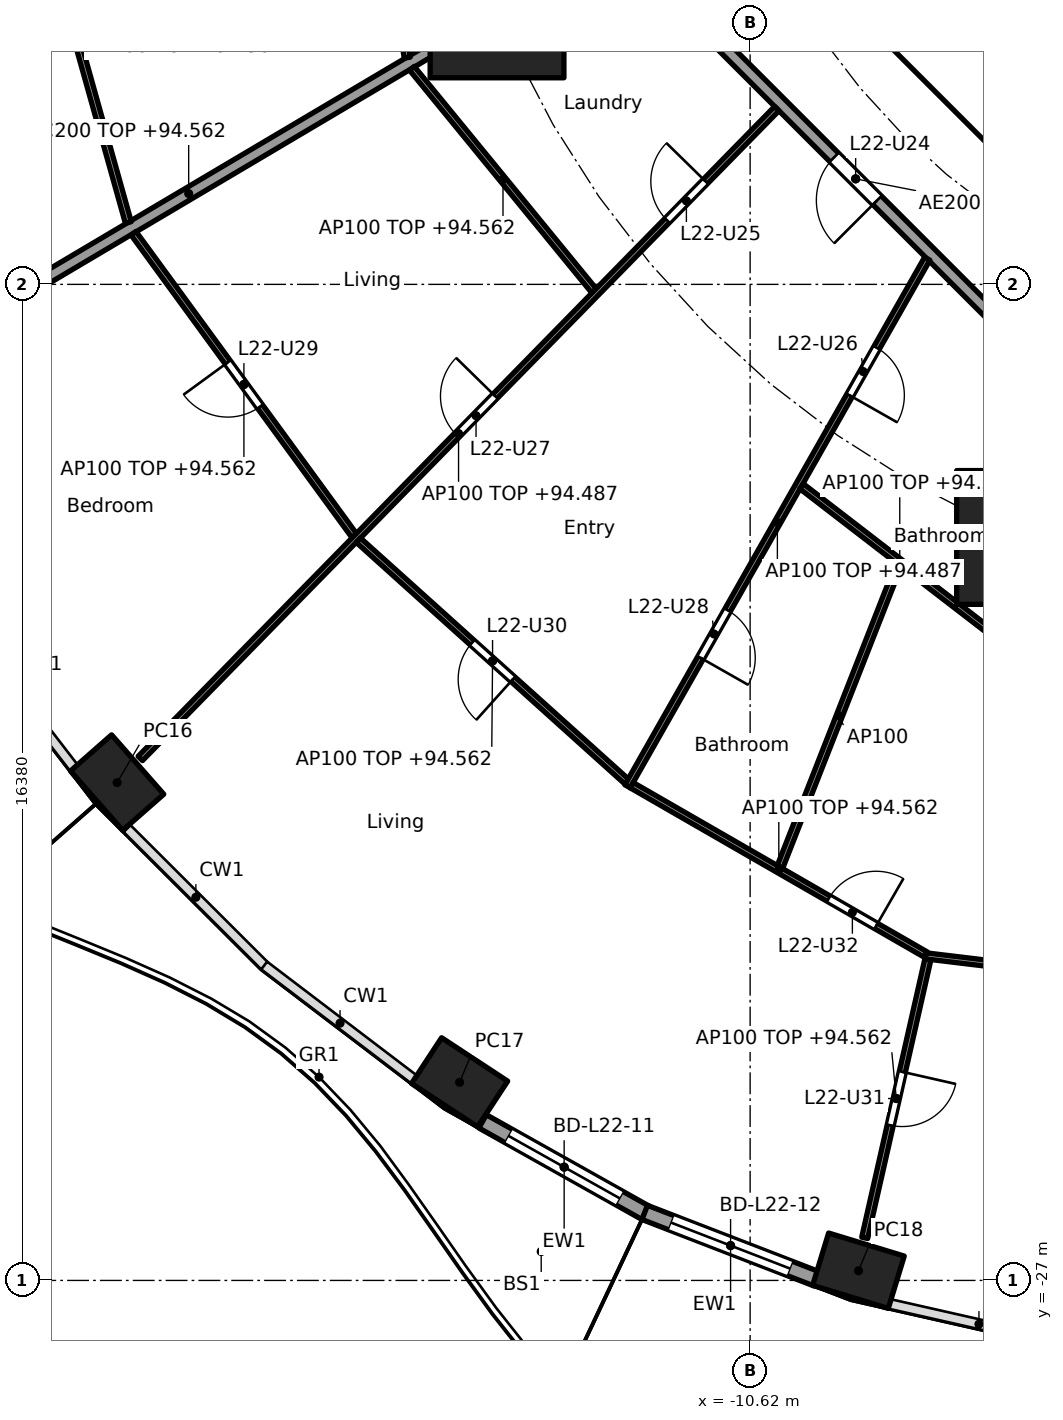
"""IFC4 building model, lengths in metres.
Left out: names, types, materials, properties, quantities, classifications, styles, units other than length and angle.
Written with IfcOpenShell. Run it as: python <this file> out.ifc"""

import sys

from ifc_helpers import new_model, si_unit, direction, frame, frame_2d, origin, origin_2d, place, context, subcontext, project, spatial, rectangle, hollow_rectangle, extrude, element, fill, save


model = new_model("IFC4")
c1 = context("Model", 3, precision=1e-05, world=origin(), true_north=direction((0.0, 1.0)))
c2 = subcontext(c1, "Body", "Model", "MODEL_VIEW")
j1 = project(units=[si_unit("LENGTHUNIT", "METRE"), si_unit("PLANEANGLEUNIT", "RADIAN")], contexts=[c1])
p1 = place(None, origin())
s1 = spatial("IfcSite", under=j1, at=p1, CompositionType="ELEMENT")
p2 = place(p1, origin())
s2 = spatial("IfcBuilding", under=s1, at=p2, CompositionType="ELEMENT")
p3 = place(p2, frame((0.0, 0.0, 91.8)))
s3 = spatial("IfcBuildingStorey", under=s2, at=p3, CompositionType="ELEMENT", Elevation=91.8)
for number, where, z_axis, x_axis in (
    (1, (-21.03, -18.813, 0.0), (0.0, 0.0, 1.0), (0.66, -0.751, 0.0)),
    (2, (-15.397, -23.742, 0.0), (0.0, 0.0, 1.0), (0.836, -0.549, 0.0)),
    (3, (-8.839, -26.841, 0.0), (0.0, 0.0, 1.0), (0.957, -0.292, 0.0)),
):
    element("IfcColumn", number, at=place(p3, frame(where, z_axis=z_axis, x_axis=x_axis)), inside=s3, PredefinedType="COLUMN", context=c2, shape_type="SweptSolid", body=[
        extrude(hollow_rectangle(XDim=1.3, YDim=0.9, WallThickness=0.045, at=origin_2d()), origin(), (0.0, 0.0, 1.0), 3.7),
    ])
for number, where, z_axis, x_axis in (
    (4, (-14.782, -6.123, 0.0), (0.0, 0.0, 1.0), (1.0, 0.0, 0.0)),
    (5, (-6.123, -14.782, 0.0), (0.0, 0.0, 1.0), (1.0, 0.0, 0.0)),
):
    element("IfcColumn", number, at=place(p3, frame(where, z_axis=z_axis, x_axis=x_axis)), inside=s3, PredefinedType="COLUMN", context=c2, shape_type="SweptSolid", body=[
        extrude(rectangle(XDim=2.2, YDim=2.2, at=origin_2d()), origin(), (0.0, 0.0, 1.0), 3.7),
    ])
p4 = place(p3, frame((-12.337, -25.889, 0.0), z_axis=(0.0, 0.0, 1.0), x_axis=(-0.872090167423, 0.489345215451, 0.0)))
e6 = element("IfcWall", 6, at=p4, inside=s3, PredefinedType="SOLIDWALL", context=c2, shape_type="SweptSolid", body=[
    extrude(rectangle(XDim=3.076, YDim=0.25, at=frame_2d((1.538, 0.0))), origin(), (0.0, 0.0, 1.0), 3.44),
])
p5 = place(p4, frame((0.488, 0.0, 0.0)))
e7 = element("IfcOpeningElement", 7, at=p5, cuts=e6, PredefinedType="OPENING", context=c2, shape_type="SweptSolid", body=[
    extrude(rectangle(XDim=2.1, YDim=2.4, at=frame_2d((1.05, 1.2))), frame((0.0, 0.135, 0.0), z_axis=(0.0, -1.0, 0.0), x_axis=(1.0, 0.0, 0.0)), (0.0, 0.0, 1.0), 0.27),
])
p6 = place(p3, frame((-9.529, -26.973, 0.0), z_axis=(0.0, 0.0, 1.0), x_axis=(-0.932827091302, 0.360324322982, 0.0)))
e8 = element("IfcWall", 8, at=p6, inside=s3, PredefinedType="SOLIDWALL", context=c2, shape_type="SweptSolid", body=[
    extrude(rectangle(XDim=3.027, YDim=0.25, at=frame_2d((1.514, 0.0))), origin(), (0.0, 0.0, 1.0), 3.44),
])
p7 = place(p6, frame((0.464, 0.0, 0.0)))
e9 = element("IfcOpeningElement", 9, at=p7, cuts=e8, PredefinedType="OPENING", context=c2, shape_type="SweptSolid", body=[
    extrude(rectangle(XDim=2.1, YDim=2.4, at=frame_2d((1.05, 1.2))), frame((0.0, 0.135, 0.0), z_axis=(0.0, -1.0, 0.0), x_axis=(1.0, 0.0, 0.0)), (0.0, 0.0, 1.0), 0.27),
])
p8 = place(p3, frame((-9.988, -4.613, 0.0), z_axis=(0.0, 0.0, 1.0), x_axis=(0.707106781187, -0.707106781187, 0.0)))
e10 = element("IfcWall", 10, at=p8, inside=s3, PredefinedType="SHEAR", context=c2, shape_type="SweptSolid", body=[
    extrude(rectangle(XDim=7.602, YDim=0.6, at=frame_2d((3.801, 0.0))), origin(), (0.0, 0.0, 1.0), 3.44),
])
p9 = place(p8, frame((6.151, 0.0, 0.0)))
e11 = element("IfcOpeningElement", 11, at=p9, cuts=e10, PredefinedType="OPENING", context=c2, shape_type="SweptSolid", body=[
    extrude(rectangle(XDim=1.1, YDim=2.1, at=frame_2d((0.55, 1.05))), frame((0.0, 0.31, 0.0), z_axis=(0.0, -1.0, 0.0), x_axis=(1.0, 0.0, 0.0)), (0.0, 0.0, 1.0), 0.62),
])
p10 = place(p3, frame((-14.825, -6.148, 0.0), z_axis=(0.0, 0.0, 1.0), x_axis=(-0.860400431487, -0.509618580408, 0.0)))
e12 = element("IfcWall", 12, at=p10, inside=s3, PredefinedType="PARTITIONING", context=c2, shape_type="SweptSolid", body=[
    extrude(rectangle(XDim=11.688, YDim=0.2, at=frame_2d((5.844, 0.0))), origin(), (0.0, 0.0, 1.0), 2.762),
])
p11 = place(p3, frame((-12.635, -5.134, 0.0), z_axis=(0.0, 0.0, 1.0), x_axis=(0.707106781187, -0.707106781187, 0.0)))
e13 = element("IfcWall", 13, at=p11, inside=s3, PredefinedType="PARTITIONING", context=c2, shape_type="SweptSolid", body=[
    extrude(rectangle(XDim=10.609, YDim=0.2, at=frame_2d((5.305, 0.0))), origin(), (0.0, 0.0, 1.0), 3.44),
])
p12 = place(p11, frame((4.804, 0.0, 0.0)))
e14 = element("IfcOpeningElement", 14, at=p12, cuts=e13, PredefinedType="OPENING", context=c2, shape_type="SweptSolid", body=[
    extrude(rectangle(XDim=1.0, YDim=2.1, at=frame_2d((0.5, 1.05))), frame((0.0, 0.11, 0.0), z_axis=(0.0, -1.0, 0.0), x_axis=(1.0, 0.0, 0.0)), (0.0, 0.0, 1.0), 0.22),
])
p13 = place(p3, frame((-16.888, -2.577, 0.0), z_axis=(0.0, 0.0, 1.0), x_axis=(0.144228053649, -0.989544475272, 0.0)))
e15 = element("IfcWall", 15, at=p13, inside=s3, PredefinedType="PARTITIONING", context=c2, shape_type="SweptSolid", body=[
    extrude(rectangle(XDim=4.359, YDim=0.1, at=frame_2d((2.179, 0.0))), origin(), (0.0, 0.0, 1.0), 2.762),
])
p14 = place(p3, frame((-22.463, -3.832, 0.0), z_axis=(0.0, 0.0, 1.0), x_axis=(0.269805201578, -0.962914925215, 0.0)))
e16 = element("IfcWall", 16, at=p14, inside=s3, PredefinedType="PARTITIONING", context=c2, shape_type="SweptSolid", body=[
    extrude(rectangle(XDim=5.993, YDim=0.1, at=frame_2d((2.997, 0.0))), origin(), (0.0, 0.0, 1.0), 2.762),
])
p15 = place(p3, frame((-16.182, -7.067, 0.0), z_axis=(0.0, 0.0, 1.0), x_axis=(0.633400832951, -0.773823871962, 0.0)))
e17 = element("IfcWall", 17, at=p15, inside=s3, PredefinedType="PARTITIONING", context=c2, shape_type="SweptSolid", body=[
    extrude(rectangle(XDim=4.729, YDim=0.1, at=frame_2d((2.365, 0.0))), origin(), (0.0, 0.0, 1.0), 2.762),
])
p16 = place(p3, frame((-20.76, -9.779, 0.0), z_axis=(0.0, 0.0, 1.0), x_axis=(0.589597019189, -0.807697564045, 0.0)))
e18 = element("IfcWall", 18, at=p16, inside=s3, PredefinedType="PARTITIONING", context=c2, shape_type="SweptSolid", body=[
    extrude(rectangle(XDim=6.158, YDim=0.1, at=frame_2d((3.079, 0.0))), origin(), (0.0, 0.0, 1.0), 2.762),
])
p17 = place(p16, frame((2.629, 0.0, 0.0)))
e19 = element("IfcOpeningElement", 19, at=p17, cuts=e18, PredefinedType="OPENING", context=c2, shape_type="SweptSolid", body=[
    extrude(rectangle(XDim=0.9, YDim=2.1, at=frame_2d((0.45, 1.05))), frame((0.0, 0.06, 0.0), z_axis=(0.0, -1.0, 0.0), x_axis=(1.0, 0.0, 0.0)), (0.0, 0.0, 1.0), 0.12),
])
p18 = place(p3, frame((-10.181, -7.729, 0.0), z_axis=(0.0, 0.0, 1.0), x_axis=(-0.699708106083, -0.714428839201, 0.0)))
e20 = element("IfcWall", 20, at=p18, inside=s3, PredefinedType="PARTITIONING", context=c2, shape_type="SweptSolid", body=[
    extrude(rectangle(XDim=14.959, YDim=0.1, at=frame_2d((7.48, 0.0))), origin(), (0.0, 0.0, 1.0), 2.687),
])
p19 = place(p18, frame((1.675, 0.0, 0.0)))
e21 = element("IfcOpeningElement", 21, at=p19, cuts=e20, PredefinedType="OPENING", context=c2, shape_type="SweptSolid", body=[
    extrude(rectangle(XDim=0.9, YDim=2.1, at=frame_2d((0.45, 1.05))), frame((0.0, 0.06, 0.0), z_axis=(0.0, -1.0, 0.0), x_axis=(1.0, 0.0, 0.0)), (0.0, 0.0, 1.0), 0.12),
])
p20 = place(p18, frame((6.619, 0.0, 0.0)))
e22 = element("IfcOpeningElement", 22, at=p20, cuts=e20, PredefinedType="OPENING", context=c2, shape_type="SweptSolid", body=[
    extrude(rectangle(XDim=0.9, YDim=2.1, at=frame_2d((0.45, 1.05))), frame((0.0, 0.06, 0.0), z_axis=(0.0, -1.0, 0.0), x_axis=(1.0, 0.0, 0.0)), (0.0, 0.0, 1.0), 0.12),
])
p21 = place(p3, frame((-17.063, -14.827, 0.0), z_axis=(0.0, 0.0, 1.0), x_axis=(0.743478142868, -0.668760234373, 0.0)))
e23 = element("IfcWall", 23, at=p21, inside=s3, PredefinedType="PARTITIONING", context=c2, shape_type="SweptSolid", body=[
    extrude(rectangle(XDim=5.937, YDim=0.1, at=frame_2d((2.969, 0.0))), origin(), (0.0, 0.0, 1.0), 2.762),
])
p22 = place(p21, frame((2.519, 0.0, 0.0)))
e24 = element("IfcOpeningElement", 24, at=p22, cuts=e23, PredefinedType="OPENING", context=c2, shape_type="SweptSolid", body=[
    extrude(rectangle(XDim=0.9, YDim=2.1, at=frame_2d((0.45, 1.05))), frame((0.0, 0.06, 0.0), z_axis=(0.0, -1.0, 0.0), x_axis=(1.0, 0.0, 0.0)), (0.0, 0.0, 1.0), 0.12),
])
p23 = place(p3, frame((-7.707, -10.198, 0.0), z_axis=(0.0, 0.0, 1.0), x_axis=(-0.493963587489, -0.869482589955, 0.0)))
e25 = element("IfcWall", 25, at=p23, inside=s3, PredefinedType="PARTITIONING", context=c2, shape_type="SweptSolid", body=[
    extrude(rectangle(XDim=9.978, YDim=0.1, at=frame_2d((4.989, 0.0))), origin(), (0.0, 0.0, 1.0), 2.687),
])
p24 = place(p23, frame((1.684, 0.0, 0.0)))
e26 = element("IfcOpeningElement", 26, at=p24, cuts=e25, PredefinedType="OPENING", context=c2, shape_type="SweptSolid", body=[
    extrude(rectangle(XDim=0.9, YDim=2.1, at=frame_2d((0.45, 1.05))), frame((0.0, 0.06, 0.0), z_axis=(0.0, -1.0, 0.0), x_axis=(1.0, 0.0, 0.0)), (0.0, 0.0, 1.0), 0.12),
])
p25 = place(p23, frame((6.648, 0.0, 0.0)))
e27 = element("IfcOpeningElement", 27, at=p25, cuts=e25, PredefinedType="OPENING", context=c2, shape_type="SweptSolid", body=[
    extrude(rectangle(XDim=0.9, YDim=2.1, at=frame_2d((0.45, 1.05))), frame((0.0, 0.06, 0.0), z_axis=(0.0, -1.0, 0.0), x_axis=(1.0, 0.0, 0.0)), (0.0, 0.0, 1.0), 0.12),
])
p26 = place(p3, frame((-9.775, -13.939, 0.0), z_axis=(0.0, 0.0, 1.0), x_axis=(0.792156642473, -0.61031783014, 0.0)))
e28 = element("IfcWall", 28, at=p26, inside=s3, PredefinedType="PARTITIONING", context=c2, shape_type="SweptSolid", body=[
    extrude(rectangle(XDim=4.08, YDim=0.1, at=frame_2d((2.04, 0.0))), origin(), (0.0, 0.0, 1.0), 2.762),
])
p27 = place(p3, frame((-12.568, -18.856, 0.0), z_axis=(0.0, 0.0, 1.0), x_axis=(0.866532513598, -0.499120629585, 0.0)))
e29 = element("IfcWall", 29, at=p27, inside=s3, PredefinedType="PARTITIONING", context=c2, shape_type="SweptSolid", body=[
    extrude(rectangle(XDim=5.585, YDim=0.1, at=frame_2d((2.792, 0.0))), origin(), (0.0, 0.0, 1.0), 2.762),
])
p28 = place(p27, frame((3.739, 0.0, 0.0)))
e30 = element("IfcOpeningElement", 30, at=p28, cuts=e29, PredefinedType="OPENING", context=c2, shape_type="SweptSolid", body=[
    extrude(rectangle(XDim=0.9, YDim=2.1, at=frame_2d((0.45, 1.05))), frame((0.0, 0.06, 0.0), z_axis=(0.0, -1.0, 0.0), x_axis=(1.0, 0.0, 0.0)), (0.0, 0.0, 1.0), 0.12),
])
p29 = place(p3, frame((-8.177, -15.231, 0.0), z_axis=(0.0, 0.0, 1.0), x_axis=(-0.365520869553, -0.930803144559, 0.0)))
e31 = element("IfcWall", 31, at=p29, inside=s3, PredefinedType="PARTITIONING", context=c2, shape_type="SweptSolid", body=[
    extrude(rectangle(XDim=5.342, YDim=0.1, at=frame_2d((2.671, 0.0))), origin(), (0.0, 0.0, 1.0), 3.44),
])
p30 = place(p3, frame((-7.696, -21.717, 0.0), z_axis=(0.0, 0.0, 1.0), x_axis=(-0.221196717441, -0.97522921008, 0.0)))
e32 = element("IfcWall", 32, at=p30, inside=s3, PredefinedType="PARTITIONING", context=c2, shape_type="SweptSolid", body=[
    extrude(rectangle(XDim=4.7, YDim=0.1, at=frame_2d((2.35, 0.0))), origin(), (0.0, 0.0, 1.0), 2.762),
])
p31 = place(p30, frame((1.9, 0.0, 0.0)))
e33 = element("IfcOpeningElement", 33, at=p31, cuts=e32, PredefinedType="OPENING", context=c2, shape_type="SweptSolid", body=[
    extrude(rectangle(XDim=0.9, YDim=2.1, at=frame_2d((0.45, 1.05))), frame((0.0, 0.06, 0.0), z_axis=(0.0, -1.0, 0.0), x_axis=(1.0, 0.0, 0.0)), (0.0, 0.0, 1.0), 0.12),
])
p32 = place(p3, frame((-7.735, -21.662, 0.0), z_axis=(0.0, 0.0, 1.0), x_axis=(0.992808347289, -0.119714600421, 0.0)))
e34 = element("IfcWall", 34, at=p32, inside=s3, PredefinedType="PARTITIONING", context=c2, shape_type="SweptSolid", body=[
    extrude(rectangle(XDim=6.053, YDim=0.1, at=frame_2d((3.026, 0.0))), origin(), (0.0, 0.0, 1.0), 2.762),
])
p33 = place(p5, origin())
e35 = element("IfcDoor", 35, at=p33, inside=s3, OperationType="SLIDING_TO_LEFT", PredefinedType="DOOR", context=c2, shape_type="SweptSolid", body=[
    extrude(rectangle(XDim=2.1, YDim=2.4, at=frame_2d((1.05, 1.2))), frame((0.0, 0.025, 0.0), z_axis=(0.0, -1.0, 0.0), x_axis=(1.0, 0.0, 0.0)), (0.0, 0.0, 1.0), 0.05),
])
fill(e7, e35)
p34 = place(p7, origin())
e36 = element("IfcDoor", 36, at=p34, inside=s3, OperationType="SLIDING_TO_LEFT", PredefinedType="DOOR", context=c2, shape_type="SweptSolid", body=[
    extrude(rectangle(XDim=2.1, YDim=2.4, at=frame_2d((1.05, 1.2))), frame((0.0, 0.025, 0.0), z_axis=(0.0, -1.0, 0.0), x_axis=(1.0, 0.0, 0.0)), (0.0, 0.0, 1.0), 0.05),
])
fill(e9, e36)
p35 = place(p12, frame((1.0, 0.0, 0.0), x_axis=(-1.0, 0.0, 0.0)))
e37 = element("IfcDoor", 37, at=p35, inside=s3, OperationType="SINGLE_SWING_LEFT", PredefinedType="DOOR", context=c2, shape_type="SweptSolid", body=[
    extrude(rectangle(XDim=1.0, YDim=2.1, at=frame_2d((0.5, 1.05))), frame((0.0, 0.025, 0.0), z_axis=(0.0, -1.0, 0.0), x_axis=(1.0, 0.0, 0.0)), (0.0, 0.0, 1.0), 0.05),
])
fill(e14, e37)
p36 = place(p19, frame((0.9, 0.0, 0.0), x_axis=(-1.0, 0.0, 0.0)))
e38 = element("IfcDoor", 38, at=p36, inside=s3, OperationType="SINGLE_SWING_RIGHT", PredefinedType="DOOR", context=c2, shape_type="SweptSolid", body=[
    extrude(rectangle(XDim=0.9, YDim=2.1, at=frame_2d((0.45, 1.05))), frame((0.0, 0.025, 0.0), z_axis=(0.0, -1.0, 0.0), x_axis=(1.0, 0.0, 0.0)), (0.0, 0.0, 1.0), 0.05),
])
fill(e21, e38)
p37 = place(p24, origin())
e39 = element("IfcDoor", 39, at=p37, inside=s3, OperationType="SINGLE_SWING_RIGHT", PredefinedType="DOOR", context=c2, shape_type="SweptSolid", body=[
    extrude(rectangle(XDim=0.9, YDim=2.1, at=frame_2d((0.45, 1.05))), frame((0.0, 0.025, 0.0), z_axis=(0.0, -1.0, 0.0), x_axis=(1.0, 0.0, 0.0)), (0.0, 0.0, 1.0), 0.05),
])
fill(e26, e39)
p38 = place(p20, frame((0.9, 0.0, 0.0), x_axis=(-1.0, 0.0, 0.0)))
e40 = element("IfcDoor", 40, at=p38, inside=s3, OperationType="SINGLE_SWING_RIGHT", PredefinedType="DOOR", context=c2, shape_type="SweptSolid", body=[
    extrude(rectangle(XDim=0.9, YDim=2.1, at=frame_2d((0.45, 1.05))), frame((0.0, 0.025, 0.0), z_axis=(0.0, -1.0, 0.0), x_axis=(1.0, 0.0, 0.0)), (0.0, 0.0, 1.0), 0.05),
])
fill(e22, e40)
p39 = place(p25, origin())
e41 = element("IfcDoor", 41, at=p39, inside=s3, OperationType="SINGLE_SWING_RIGHT", PredefinedType="DOOR", context=c2, shape_type="SweptSolid", body=[
    extrude(rectangle(XDim=0.9, YDim=2.1, at=frame_2d((0.45, 1.05))), frame((0.0, 0.025, 0.0), z_axis=(0.0, -1.0, 0.0), x_axis=(1.0, 0.0, 0.0)), (0.0, 0.0, 1.0), 0.05),
])
fill(e27, e41)
p40 = place(p17, frame((0.9, 0.0, 0.0), x_axis=(-1.0, 0.0, 0.0)))
e42 = element("IfcDoor", 42, at=p40, inside=s3, OperationType="SINGLE_SWING_RIGHT", PredefinedType="DOOR", context=c2, shape_type="SweptSolid", body=[
    extrude(rectangle(XDim=0.9, YDim=2.1, at=frame_2d((0.45, 1.05))), frame((0.0, 0.025, 0.0), z_axis=(0.0, -1.0, 0.0), x_axis=(1.0, 0.0, 0.0)), (0.0, 0.0, 1.0), 0.05),
])
fill(e19, e42)
p41 = place(p22, frame((0.9, 0.0, 0.0), x_axis=(-1.0, 0.0, 0.0)))
e43 = element("IfcDoor", 43, at=p41, inside=s3, OperationType="SINGLE_SWING_LEFT", PredefinedType="DOOR", context=c2, shape_type="SweptSolid", body=[
    extrude(rectangle(XDim=0.9, YDim=2.1, at=frame_2d((0.45, 1.05))), frame((0.0, 0.025, 0.0), z_axis=(0.0, -1.0, 0.0), x_axis=(1.0, 0.0, 0.0)), (0.0, 0.0, 1.0), 0.05),
])
fill(e24, e43)
p42 = place(p31, origin())
e44 = element("IfcDoor", 44, at=p42, inside=s3, OperationType="SINGLE_SWING_LEFT", PredefinedType="DOOR", context=c2, shape_type="SweptSolid", body=[
    extrude(rectangle(XDim=0.9, YDim=2.1, at=frame_2d((0.45, 1.05))), frame((0.0, 0.025, 0.0), z_axis=(0.0, -1.0, 0.0), x_axis=(1.0, 0.0, 0.0)), (0.0, 0.0, 1.0), 0.05),
])
fill(e33, e44)
p43 = place(p28, origin())
e45 = element("IfcDoor", 45, at=p43, inside=s3, OperationType="SINGLE_SWING_RIGHT", PredefinedType="DOOR", context=c2, shape_type="SweptSolid", body=[
    extrude(rectangle(XDim=0.9, YDim=2.1, at=frame_2d((0.45, 1.05))), frame((0.0, 0.025, 0.0), z_axis=(0.0, -1.0, 0.0), x_axis=(1.0, 0.0, 0.0)), (0.0, 0.0, 1.0), 0.05),
])
fill(e30, e45)
save(model, sys.argv[1])
